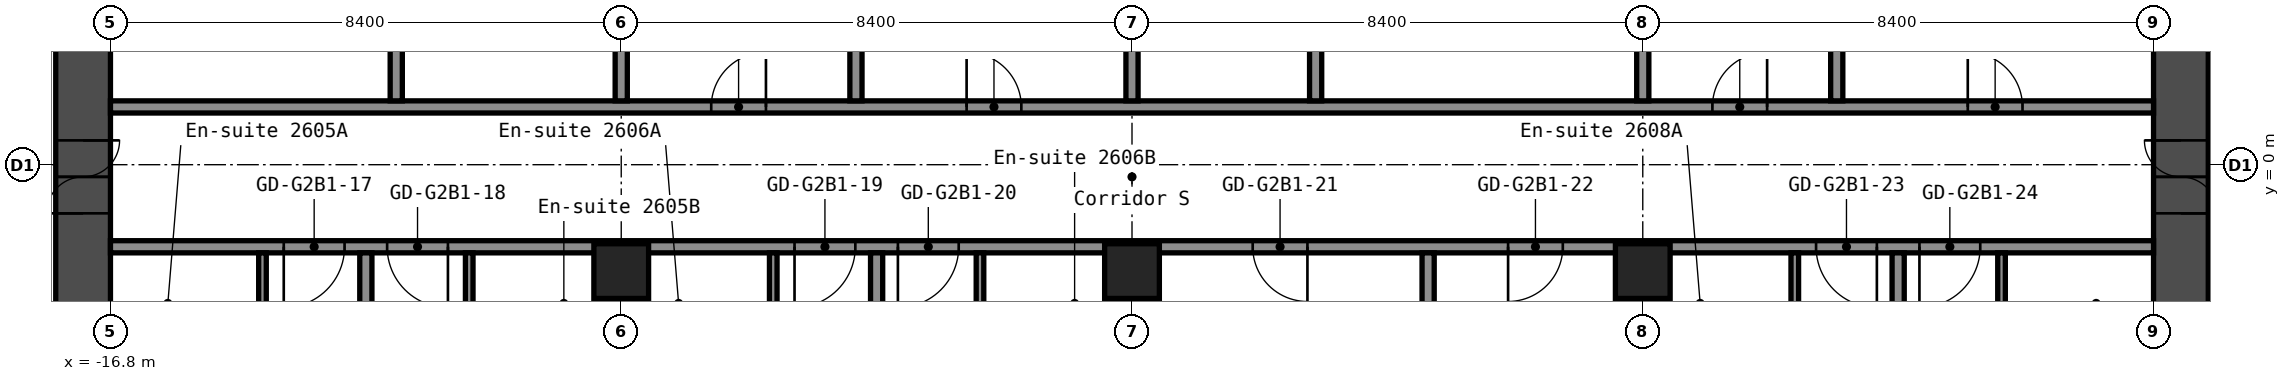
"""IFC4 building model, lengths in metres.
Left out: names, types, materials, properties, quantities, classifications, styles, units other than length and angle.
Written with IfcOpenShell. Run it as: python <this file> out.ifc"""

import sys

from ifc_helpers import new_model, si_unit, direction, frame, frame_2d, origin, origin_2d, place, context, subcontext, project, spatial, rectangle, hollow_rectangle, extrude, element, fill, save


model = new_model("IFC4")
c1 = context("Model", 3, precision=1e-05, world=origin(), true_north=direction((0.0, 1.0)))
c2 = subcontext(c1, "Body", "Model", "MODEL_VIEW")
j1 = project(units=[si_unit("LENGTHUNIT", "METRE"), si_unit("PLANEANGLEUNIT", "RADIAN")], contexts=[c1])
p1 = place(None, origin())
s1 = spatial("IfcSite", under=j1, at=p1, CompositionType="ELEMENT")
p2 = place(p1, origin())
s2 = spatial("IfcBuilding", under=s1, at=p2, CompositionType="ELEMENT")
p3 = place(p2, frame((0.0, 0.0, 94.6)))
s3 = spatial("IfcBuildingStorey", under=s2, at=p3, CompositionType="ELEMENT", Elevation=94.6)
for number, where, z_axis, x_axis in (
    (1, (-8.4, -1.75, 0.0), (0.0, 0.0, 1.0), (1.0, 0.0, 0.0)),
    (2, (0.0, -1.75, 0.0), (0.0, 0.0, 1.0), (1.0, 0.0, 0.0)),
    (3, (8.4, -1.75, 0.0), (0.0, 0.0, 1.0), (1.0, 0.0, 0.0)),
):
    element("IfcColumn", number, at=place(p3, frame(where, z_axis=z_axis, x_axis=x_axis)), inside=s3, PredefinedType="COLUMN", context=c2, shape_type="SweptSolid", body=[
        extrude(hollow_rectangle(XDim=0.9, YDim=0.9, WallThickness=0.036, at=origin_2d()), origin(), (0.0, 0.0, 1.0), 2.8),
    ])
p4 = place(p3, frame((-17.25, -8.4, 0.0), z_axis=(0.0, 0.0, 1.0), x_axis=(0.0, 1.0, 0.0)))
e4 = element("IfcWall", 4, at=p4, inside=s3, PredefinedType="SHEAR", context=c2, shape_type="SweptSolid", body=[
    extrude(rectangle(XDim=16.8, YDim=0.9, at=frame_2d((8.4, 0.0))), origin(), (0.0, 0.0, 1.0), 2.8),
])
p5 = place(p4, frame((7.6, 0.0, 0.0)))
e5 = element("IfcOpeningElement", 5, at=p5, cuts=e4, PredefinedType="OPENING", context=c2, shape_type="SweptSolid", body=[
    extrude(rectangle(XDim=1.2, YDim=2.1, at=frame_2d((0.6, 1.05))), frame((0.0, 0.46, 0.0), z_axis=(0.0, -1.0, 0.0), x_axis=(1.0, 0.0, 0.0)), (0.0, 0.0, 1.0), 0.92),
])
p6 = place(p3, frame((17.25, -8.4, 0.0), z_axis=(0.0, 0.0, 1.0), x_axis=(0.0, 1.0, 0.0)))
e6 = element("IfcWall", 6, at=p6, inside=s3, PredefinedType="SHEAR", context=c2, shape_type="SweptSolid", body=[
    extrude(rectangle(XDim=16.8, YDim=0.9, at=frame_2d((8.4, 0.0))), origin(), (0.0, 0.0, 1.0), 2.8),
])
p7 = place(p6, frame((7.6, 0.0, 0.0)))
e7 = element("IfcOpeningElement", 7, at=p7, cuts=e6, PredefinedType="OPENING", context=c2, shape_type="SweptSolid", body=[
    extrude(rectangle(XDim=1.2, YDim=2.1, at=frame_2d((0.6, 1.05))), frame((0.0, 0.46, 0.0), z_axis=(0.0, -1.0, 0.0), x_axis=(1.0, 0.0, 0.0)), (0.0, 0.0, 1.0), 0.92),
])
p8 = place(p3, frame((-16.8, -1.35, 0.0), z_axis=(0.0, 0.0, 1.0), x_axis=(1.0, 0.0, 0.0)))
e8 = element("IfcWall", 8, at=p8, inside=s3, PredefinedType="PARTITIONING", context=c2, shape_type="SweptSolid", body=[
    extrude(rectangle(XDim=33.6, YDim=0.2, at=frame_2d((16.8, 0.0))), origin(), (0.0, 0.0, 1.0), 2.8),
])
p9 = place(p8, frame((2.85, 0.0, 0.0)))
e9 = element("IfcOpeningElement", 9, at=p9, cuts=e8, PredefinedType="OPENING", context=c2, shape_type="SweptSolid", body=[
    extrude(rectangle(XDim=1.0, YDim=2.1, at=frame_2d((0.5, 1.05))), frame((0.0, 0.11, 0.0), z_axis=(0.0, -1.0, 0.0), x_axis=(1.0, 0.0, 0.0)), (0.0, 0.0, 1.0), 0.22),
])
p10 = place(p8, frame((4.55, 0.0, 0.0)))
e10 = element("IfcOpeningElement", 10, at=p10, cuts=e8, PredefinedType="OPENING", context=c2, shape_type="SweptSolid", body=[
    extrude(rectangle(XDim=1.0, YDim=2.1, at=frame_2d((0.5, 1.05))), frame((0.0, 0.11, 0.0), z_axis=(0.0, -1.0, 0.0), x_axis=(1.0, 0.0, 0.0)), (0.0, 0.0, 1.0), 0.22),
])
p11 = place(p8, frame((11.25, 0.0, 0.0)))
e11 = element("IfcOpeningElement", 11, at=p11, cuts=e8, PredefinedType="OPENING", context=c2, shape_type="SweptSolid", body=[
    extrude(rectangle(XDim=1.0, YDim=2.1, at=frame_2d((0.5, 1.05))), frame((0.0, 0.11, 0.0), z_axis=(0.0, -1.0, 0.0), x_axis=(1.0, 0.0, 0.0)), (0.0, 0.0, 1.0), 0.22),
])
p12 = place(p8, frame((12.95, 0.0, 0.0)))
e12 = element("IfcOpeningElement", 12, at=p12, cuts=e8, PredefinedType="OPENING", context=c2, shape_type="SweptSolid", body=[
    extrude(rectangle(XDim=1.0, YDim=2.1, at=frame_2d((0.5, 1.05))), frame((0.0, 0.11, 0.0), z_axis=(0.0, -1.0, 0.0), x_axis=(1.0, 0.0, 0.0)), (0.0, 0.0, 1.0), 0.22),
])
p13 = place(p8, frame((18.785, 0.0, 0.0)))
e13 = element("IfcOpeningElement", 13, at=p13, cuts=e8, PredefinedType="OPENING", context=c2, shape_type="SweptSolid", body=[
    extrude(rectangle(XDim=0.9, YDim=2.1, at=frame_2d((0.45, 1.05))), frame((0.0, 0.11, 0.0), z_axis=(0.0, -1.0, 0.0), x_axis=(1.0, 0.0, 0.0)), (0.0, 0.0, 1.0), 0.22),
])
p14 = place(p8, frame((22.985, 0.0, 0.0)))
e14 = element("IfcOpeningElement", 14, at=p14, cuts=e8, PredefinedType="OPENING", context=c2, shape_type="SweptSolid", body=[
    extrude(rectangle(XDim=0.9, YDim=2.1, at=frame_2d((0.45, 1.05))), frame((0.0, 0.11, 0.0), z_axis=(0.0, -1.0, 0.0), x_axis=(1.0, 0.0, 0.0)), (0.0, 0.0, 1.0), 0.22),
])
p15 = place(p8, frame((28.05, 0.0, 0.0)))
e15 = element("IfcOpeningElement", 15, at=p15, cuts=e8, PredefinedType="OPENING", context=c2, shape_type="SweptSolid", body=[
    extrude(rectangle(XDim=1.0, YDim=2.1, at=frame_2d((0.5, 1.05))), frame((0.0, 0.11, 0.0), z_axis=(0.0, -1.0, 0.0), x_axis=(1.0, 0.0, 0.0)), (0.0, 0.0, 1.0), 0.22),
])
p16 = place(p8, frame((29.75, 0.0, 0.0)))
e16 = element("IfcOpeningElement", 16, at=p16, cuts=e8, PredefinedType="OPENING", context=c2, shape_type="SweptSolid", body=[
    extrude(rectangle(XDim=1.0, YDim=2.1, at=frame_2d((0.5, 1.05))), frame((0.0, 0.11, 0.0), z_axis=(0.0, -1.0, 0.0), x_axis=(1.0, 0.0, 0.0)), (0.0, 0.0, 1.0), 0.22),
])
p17 = place(p3, frame((-16.8, 0.95, 0.0), z_axis=(0.0, 0.0, 1.0), x_axis=(1.0, 0.0, 0.0)))
e17 = element("IfcWall", 17, at=p17, inside=s3, PredefinedType="PARTITIONING", context=c2, shape_type="SweptSolid", body=[
    extrude(rectangle(XDim=33.6, YDim=0.2, at=frame_2d((16.8, 0.0))), origin(), (0.0, 0.0, 1.0), 2.8),
])
p18 = place(p17, frame((9.88, 0.0, 0.0)))
e18 = element("IfcOpeningElement", 18, at=p18, cuts=e17, PredefinedType="OPENING", context=c2, shape_type="SweptSolid", body=[
    extrude(rectangle(XDim=0.9, YDim=2.1, at=frame_2d((0.45, 1.05))), frame((0.0, 0.11, 0.0), z_axis=(0.0, -1.0, 0.0), x_axis=(1.0, 0.0, 0.0)), (0.0, 0.0, 1.0), 0.22),
])
p19 = place(p17, frame((14.08, 0.0, 0.0)))
e19 = element("IfcOpeningElement", 19, at=p19, cuts=e17, PredefinedType="OPENING", context=c2, shape_type="SweptSolid", body=[
    extrude(rectangle(XDim=0.9, YDim=2.1, at=frame_2d((0.45, 1.05))), frame((0.0, 0.11, 0.0), z_axis=(0.0, -1.0, 0.0), x_axis=(1.0, 0.0, 0.0)), (0.0, 0.0, 1.0), 0.22),
])
p20 = place(p17, frame((26.345, 0.0, 0.0)))
e20 = element("IfcOpeningElement", 20, at=p20, cuts=e17, PredefinedType="OPENING", context=c2, shape_type="SweptSolid", body=[
    extrude(rectangle(XDim=0.9, YDim=2.1, at=frame_2d((0.45, 1.05))), frame((0.0, 0.11, 0.0), z_axis=(0.0, -1.0, 0.0), x_axis=(1.0, 0.0, 0.0)), (0.0, 0.0, 1.0), 0.22),
])
p21 = place(p17, frame((30.545, 0.0, 0.0)))
e21 = element("IfcOpeningElement", 21, at=p21, cuts=e17, PredefinedType="OPENING", context=c2, shape_type="SweptSolid", body=[
    extrude(rectangle(XDim=0.9, YDim=2.1, at=frame_2d((0.45, 1.05))), frame((0.0, 0.11, 0.0), z_axis=(0.0, -1.0, 0.0), x_axis=(1.0, 0.0, 0.0)), (0.0, 0.0, 1.0), 0.22),
])
p22 = place(p3, frame((-14.3, -4.35, 0.0), z_axis=(0.0, 0.0, 1.0), x_axis=(0.0, 1.0, 0.0)))
e22 = element("IfcWall", 22, at=p22, inside=s3, PredefinedType="PARTITIONING", context=c2, shape_type="SweptSolid", body=[
    extrude(rectangle(XDim=2.9, YDim=0.125, at=frame_2d((1.45, 0.0))), origin(), (0.0, 0.0, 1.0), 2.8),
])
p23 = place(p22, frame((0.6, 0.0, 0.0)))
e23 = element("IfcOpeningElement", 23, at=p23, cuts=e22, PredefinedType="OPENING", context=c2, shape_type="SweptSolid", body=[
    extrude(rectangle(XDim=0.8, YDim=2.1, at=frame_2d((0.4, 1.05))), frame((0.0, 0.073, 0.0), z_axis=(0.0, -1.0, 0.0), x_axis=(1.0, 0.0, 0.0)), (0.0, 0.0, 1.0), 0.145),
])
p24 = place(p3, frame((-12.6, -15.55, 0.0), z_axis=(0.0, 0.0, 1.0), x_axis=(0.0, 1.0, 0.0)))
e24 = element("IfcWall", 24, at=p24, inside=s3, PredefinedType="PARTITIONING", context=c2, shape_type="SweptSolid", body=[
    extrude(rectangle(XDim=14.1, YDim=0.2, at=frame_2d((7.05, 0.0))), origin(), (0.0, 0.0, 1.0), 2.8),
])
p25 = place(p3, frame((-12.1, 1.05, 0.0), z_axis=(0.0, 0.0, 1.0), x_axis=(0.0, 1.0, 0.0)))
e25 = element("IfcWall", 25, at=p25, inside=s3, PredefinedType="PARTITIONING", context=c2, shape_type="SweptSolid", body=[
    extrude(rectangle(XDim=5.9, YDim=0.2, at=frame_2d((2.95, 0.0))), origin(), (0.0, 0.0, 1.0), 2.8),
])
p26 = place(p3, frame((-10.9, -4.35, 0.0), z_axis=(0.0, 0.0, 1.0), x_axis=(0.0, 1.0, 0.0)))
e26 = element("IfcWall", 26, at=p26, inside=s3, PredefinedType="PARTITIONING", context=c2, shape_type="SweptSolid", body=[
    extrude(rectangle(XDim=2.9, YDim=0.125, at=frame_2d((1.45, 0.0))), origin(), (0.0, 0.0, 1.0), 2.8),
])
p27 = place(p26, frame((0.6, 0.0, 0.0)))
e27 = element("IfcOpeningElement", 27, at=p27, cuts=e26, PredefinedType="OPENING", context=c2, shape_type="SweptSolid", body=[
    extrude(rectangle(XDim=0.8, YDim=2.1, at=frame_2d((0.4, 1.05))), frame((0.0, 0.073, 0.0), z_axis=(0.0, -1.0, 0.0), x_axis=(1.0, 0.0, 0.0)), (0.0, 0.0, 1.0), 0.145),
])
p28 = place(p3, frame((-8.4, -15.55, 0.0), z_axis=(0.0, 0.0, 1.0), x_axis=(0.0, 1.0, 0.0)))
e28 = element("IfcWall", 28, at=p28, inside=s3, PredefinedType="PARTITIONING", context=c2, shape_type="SweptSolid", body=[
    extrude(rectangle(XDim=13.36, YDim=0.2, at=frame_2d((6.68, 0.0))), origin(), (0.0, 0.0, 1.0), 2.8),
])
p29 = place(p3, frame((-8.4, 1.05, 0.0), z_axis=(0.0, 0.0, 1.0), x_axis=(0.0, 1.0, 0.0)))
e29 = element("IfcWall", 29, at=p29, inside=s3, PredefinedType="PARTITIONING", context=c2, shape_type="SweptSolid", body=[
    extrude(rectangle(XDim=5.9, YDim=0.2, at=frame_2d((2.95, 0.0))), origin(), (0.0, 0.0, 1.0), 2.8),
])
p30 = place(p3, frame((-5.9, -4.35, 0.0), z_axis=(0.0, 0.0, 1.0), x_axis=(0.0, 1.0, 0.0)))
e30 = element("IfcWall", 30, at=p30, inside=s3, PredefinedType="PARTITIONING", context=c2, shape_type="SweptSolid", body=[
    extrude(rectangle(XDim=2.9, YDim=0.125, at=frame_2d((1.45, 0.0))), origin(), (0.0, 0.0, 1.0), 2.8),
])
p31 = place(p30, frame((0.6, 0.0, 0.0)))
e31 = element("IfcOpeningElement", 31, at=p31, cuts=e30, PredefinedType="OPENING", context=c2, shape_type="SweptSolid", body=[
    extrude(rectangle(XDim=0.8, YDim=2.1, at=frame_2d((0.4, 1.05))), frame((0.0, 0.073, 0.0), z_axis=(0.0, -1.0, 0.0), x_axis=(1.0, 0.0, 0.0)), (0.0, 0.0, 1.0), 0.145),
])
p32 = place(p3, frame((-4.54, 1.05, 0.0), z_axis=(0.0, 0.0, 1.0), x_axis=(0.0, 1.0, 0.0)))
e32 = element("IfcWall", 32, at=p32, inside=s3, PredefinedType="PARTITIONING", context=c2, shape_type="SweptSolid", body=[
    extrude(rectangle(XDim=5.9, YDim=0.2, at=frame_2d((2.95, 0.0))), origin(), (0.0, 0.0, 1.0), 2.8),
])
p33 = place(p3, frame((-4.2, -15.55, 0.0), z_axis=(0.0, 0.0, 1.0), x_axis=(0.0, 1.0, 0.0)))
e33 = element("IfcWall", 33, at=p33, inside=s3, PredefinedType="PARTITIONING", context=c2, shape_type="SweptSolid", body=[
    extrude(rectangle(XDim=14.1, YDim=0.2, at=frame_2d((7.05, 0.0))), origin(), (0.0, 0.0, 1.0), 2.8),
])
p34 = place(p3, frame((-2.5, -4.35, 0.0), z_axis=(0.0, 0.0, 1.0), x_axis=(0.0, 1.0, 0.0)))
e34 = element("IfcWall", 34, at=p34, inside=s3, PredefinedType="PARTITIONING", context=c2, shape_type="SweptSolid", body=[
    extrude(rectangle(XDim=2.9, YDim=0.125, at=frame_2d((1.45, 0.0))), origin(), (0.0, 0.0, 1.0), 2.8),
])
p35 = place(p34, frame((0.6, 0.0, 0.0)))
e35 = element("IfcOpeningElement", 35, at=p35, cuts=e34, PredefinedType="OPENING", context=c2, shape_type="SweptSolid", body=[
    extrude(rectangle(XDim=0.8, YDim=2.1, at=frame_2d((0.4, 1.05))), frame((0.0, 0.073, 0.0), z_axis=(0.0, -1.0, 0.0), x_axis=(1.0, 0.0, 0.0)), (0.0, 0.0, 1.0), 0.145),
])
p36 = place(p3, frame((0.0, -15.55, 0.0), z_axis=(0.0, 0.0, 1.0), x_axis=(0.0, 1.0, 0.0)))
e36 = element("IfcWall", 36, at=p36, inside=s3, PredefinedType="PARTITIONING", context=c2, shape_type="SweptSolid", body=[
    extrude(rectangle(XDim=13.36, YDim=0.2, at=frame_2d((6.68, 0.0))), origin(), (0.0, 0.0, 1.0), 2.8),
])
for number, where, z_axis, x_axis in (
    (37, (0.0, 1.05, 0.0), (0.0, 0.0, 1.0), (0.0, 1.0, 0.0)),
    (38, (3.02, 1.05, 0.0), (0.0, 0.0, 1.0), (0.0, 1.0, 0.0)),
):
    element("IfcWall", number, at=place(p3, frame(where, z_axis=z_axis, x_axis=x_axis)), inside=s3, PredefinedType="PARTITIONING", context=c2, shape_type="SweptSolid", body=[
        extrude(rectangle(XDim=5.9, YDim=0.2, at=frame_2d((2.95, 0.0))), origin(), (0.0, 0.0, 1.0), 2.8),
    ])
p37 = place(p3, frame((4.87, -15.55, 0.0), z_axis=(0.0, 0.0, 1.0), x_axis=(0.0, 1.0, 0.0)))
e39 = element("IfcWall", 39, at=p37, inside=s3, PredefinedType="PARTITIONING", context=c2, shape_type="SweptSolid", body=[
    extrude(rectangle(XDim=14.1, YDim=0.2, at=frame_2d((7.05, 0.0))), origin(), (0.0, 0.0, 1.0), 2.8),
])
p38 = place(p3, frame((8.4, -15.55, 0.0), z_axis=(0.0, 0.0, 1.0), x_axis=(0.0, 1.0, 0.0)))
e40 = element("IfcWall", 40, at=p38, inside=s3, PredefinedType="PARTITIONING", context=c2, shape_type="SweptSolid", body=[
    extrude(rectangle(XDim=13.36, YDim=0.2, at=frame_2d((6.68, 0.0))), origin(), (0.0, 0.0, 1.0), 2.8),
])
p39 = place(p3, frame((8.4, 1.05, 0.0), z_axis=(0.0, 0.0, 1.0), x_axis=(0.0, 1.0, 0.0)))
e41 = element("IfcWall", 41, at=p39, inside=s3, PredefinedType="PARTITIONING", context=c2, shape_type="SweptSolid", body=[
    extrude(rectangle(XDim=5.9, YDim=0.2, at=frame_2d((2.95, 0.0))), origin(), (0.0, 0.0, 1.0), 2.8),
])
p40 = place(p3, frame((10.9, -4.35, 0.0), z_axis=(0.0, 0.0, 1.0), x_axis=(0.0, 1.0, 0.0)))
e42 = element("IfcWall", 42, at=p40, inside=s3, PredefinedType="PARTITIONING", context=c2, shape_type="SweptSolid", body=[
    extrude(rectangle(XDim=2.9, YDim=0.125, at=frame_2d((1.45, 0.0))), origin(), (0.0, 0.0, 1.0), 2.8),
])
p41 = place(p40, frame((0.6, 0.0, 0.0)))
e43 = element("IfcOpeningElement", 43, at=p41, cuts=e42, PredefinedType="OPENING", context=c2, shape_type="SweptSolid", body=[
    extrude(rectangle(XDim=0.8, YDim=2.1, at=frame_2d((0.4, 1.05))), frame((0.0, 0.073, 0.0), z_axis=(0.0, -1.0, 0.0), x_axis=(1.0, 0.0, 0.0)), (0.0, 0.0, 1.0), 0.145),
])
p42 = place(p3, frame((11.59, 1.05, 0.0), z_axis=(0.0, 0.0, 1.0), x_axis=(0.0, 1.0, 0.0)))
e44 = element("IfcWall", 44, at=p42, inside=s3, PredefinedType="PARTITIONING", context=c2, shape_type="SweptSolid", body=[
    extrude(rectangle(XDim=5.9, YDim=0.2, at=frame_2d((2.95, 0.0))), origin(), (0.0, 0.0, 1.0), 2.8),
])
p43 = place(p3, frame((12.6, -15.55, 0.0), z_axis=(0.0, 0.0, 1.0), x_axis=(0.0, 1.0, 0.0)))
e45 = element("IfcWall", 45, at=p43, inside=s3, PredefinedType="PARTITIONING", context=c2, shape_type="SweptSolid", body=[
    extrude(rectangle(XDim=14.1, YDim=0.2, at=frame_2d((7.05, 0.0))), origin(), (0.0, 0.0, 1.0), 2.8),
])
p44 = place(p3, frame((14.3, -4.35, 0.0), z_axis=(0.0, 0.0, 1.0), x_axis=(0.0, 1.0, 0.0)))
e46 = element("IfcWall", 46, at=p44, inside=s3, PredefinedType="PARTITIONING", context=c2, shape_type="SweptSolid", body=[
    extrude(rectangle(XDim=2.9, YDim=0.125, at=frame_2d((1.45, 0.0))), origin(), (0.0, 0.0, 1.0), 2.8),
])
p45 = place(p44, frame((0.6, 0.0, 0.0)))
e47 = element("IfcOpeningElement", 47, at=p45, cuts=e46, PredefinedType="OPENING", context=c2, shape_type="SweptSolid", body=[
    extrude(rectangle(XDim=0.8, YDim=2.1, at=frame_2d((0.4, 1.05))), frame((0.0, 0.073, 0.0), z_axis=(0.0, -1.0, 0.0), x_axis=(1.0, 0.0, 0.0)), (0.0, 0.0, 1.0), 0.145),
])
p46 = place(p5, origin())
e48 = element("IfcDoor", 48, at=p46, inside=s3, OperationType="DOUBLE_DOOR_SINGLE_SWING", PredefinedType="DOOR", context=c2, shape_type="SweptSolid", body=[
    extrude(rectangle(XDim=1.2, YDim=2.1, at=frame_2d((0.6, 1.05))), frame((0.0, 0.025, 0.0), z_axis=(0.0, -1.0, 0.0), x_axis=(1.0, 0.0, 0.0)), (0.0, 0.0, 1.0), 0.05),
])
fill(e5, e48)
p47 = place(p7, origin())
e49 = element("IfcDoor", 49, at=p47, inside=s3, OperationType="DOUBLE_DOOR_SINGLE_SWING", PredefinedType="DOOR", context=c2, shape_type="SweptSolid", body=[
    extrude(rectangle(XDim=1.2, YDim=2.1, at=frame_2d((0.6, 1.05))), frame((0.0, 0.025, 0.0), z_axis=(0.0, -1.0, 0.0), x_axis=(1.0, 0.0, 0.0)), (0.0, 0.0, 1.0), 0.05),
])
fill(e7, e49)
p48 = place(p9, origin())
e50 = element("IfcDoor", 50, at=p48, inside=s3, OperationType="SINGLE_SWING_LEFT", PredefinedType="DOOR", context=c2, shape_type="SweptSolid", body=[
    extrude(rectangle(XDim=1.0, YDim=2.1, at=frame_2d((0.5, 1.05))), frame((0.0, 0.025, 0.0), z_axis=(0.0, -1.0, 0.0), x_axis=(1.0, 0.0, 0.0)), (0.0, 0.0, 1.0), 0.05),
])
fill(e9, e50)
p49 = place(p10, origin())
e51 = element("IfcDoor", 51, at=p49, inside=s3, OperationType="SINGLE_SWING_RIGHT", PredefinedType="DOOR", context=c2, shape_type="SweptSolid", body=[
    extrude(rectangle(XDim=1.0, YDim=2.1, at=frame_2d((0.5, 1.05))), frame((0.0, 0.025, 0.0), z_axis=(0.0, -1.0, 0.0), x_axis=(1.0, 0.0, 0.0)), (0.0, 0.0, 1.0), 0.05),
])
fill(e10, e51)
p50 = place(p11, origin())
e52 = element("IfcDoor", 52, at=p50, inside=s3, OperationType="SINGLE_SWING_LEFT", PredefinedType="DOOR", context=c2, shape_type="SweptSolid", body=[
    extrude(rectangle(XDim=1.0, YDim=2.1, at=frame_2d((0.5, 1.05))), frame((0.0, 0.025, 0.0), z_axis=(0.0, -1.0, 0.0), x_axis=(1.0, 0.0, 0.0)), (0.0, 0.0, 1.0), 0.05),
])
fill(e11, e52)
p51 = place(p12, origin())
e53 = element("IfcDoor", 53, at=p51, inside=s3, OperationType="SINGLE_SWING_LEFT", PredefinedType="DOOR", context=c2, shape_type="SweptSolid", body=[
    extrude(rectangle(XDim=1.0, YDim=2.1, at=frame_2d((0.5, 1.05))), frame((0.0, 0.025, 0.0), z_axis=(0.0, -1.0, 0.0), x_axis=(1.0, 0.0, 0.0)), (0.0, 0.0, 1.0), 0.05),
])
fill(e12, e53)
p52 = place(p13, origin())
e54 = element("IfcDoor", 54, at=p52, inside=s3, OperationType="SINGLE_SWING_RIGHT", PredefinedType="DOOR", context=c2, shape_type="SweptSolid", body=[
    extrude(rectangle(XDim=0.9, YDim=2.1, at=frame_2d((0.45, 1.05))), frame((0.0, 0.025, 0.0), z_axis=(0.0, -1.0, 0.0), x_axis=(1.0, 0.0, 0.0)), (0.0, 0.0, 1.0), 0.05),
])
fill(e13, e54)
p53 = place(p14, origin())
e55 = element("IfcDoor", 55, at=p53, inside=s3, OperationType="SINGLE_SWING_LEFT", PredefinedType="DOOR", context=c2, shape_type="SweptSolid", body=[
    extrude(rectangle(XDim=0.9, YDim=2.1, at=frame_2d((0.45, 1.05))), frame((0.0, 0.025, 0.0), z_axis=(0.0, -1.0, 0.0), x_axis=(1.0, 0.0, 0.0)), (0.0, 0.0, 1.0), 0.05),
])
fill(e14, e55)
p54 = place(p15, origin())
e56 = element("IfcDoor", 56, at=p54, inside=s3, OperationType="SINGLE_SWING_RIGHT", PredefinedType="DOOR", context=c2, shape_type="SweptSolid", body=[
    extrude(rectangle(XDim=1.0, YDim=2.1, at=frame_2d((0.5, 1.05))), frame((0.0, 0.025, 0.0), z_axis=(0.0, -1.0, 0.0), x_axis=(1.0, 0.0, 0.0)), (0.0, 0.0, 1.0), 0.05),
])
fill(e15, e56)
p55 = place(p16, origin())
e57 = element("IfcDoor", 57, at=p55, inside=s3, OperationType="SINGLE_SWING_LEFT", PredefinedType="DOOR", context=c2, shape_type="SweptSolid", body=[
    extrude(rectangle(XDim=1.0, YDim=2.1, at=frame_2d((0.5, 1.05))), frame((0.0, 0.025, 0.0), z_axis=(0.0, -1.0, 0.0), x_axis=(1.0, 0.0, 0.0)), (0.0, 0.0, 1.0), 0.05),
])
fill(e16, e57)
p56 = place(p18, origin())
e58 = element("IfcDoor", 58, at=p56, inside=s3, OperationType="SINGLE_SWING_LEFT", PredefinedType="DOOR", context=c2, shape_type="SweptSolid", body=[
    extrude(rectangle(XDim=0.9, YDim=2.1, at=frame_2d((0.45, 1.05))), frame((0.0, 0.025, 0.0), z_axis=(0.0, -1.0, 0.0), x_axis=(1.0, 0.0, 0.0)), (0.0, 0.0, 1.0), 0.05),
])
fill(e18, e58)
p57 = place(p19, origin())
e59 = element("IfcDoor", 59, at=p57, inside=s3, OperationType="SINGLE_SWING_RIGHT", PredefinedType="DOOR", context=c2, shape_type="SweptSolid", body=[
    extrude(rectangle(XDim=0.9, YDim=2.1, at=frame_2d((0.45, 1.05))), frame((0.0, 0.025, 0.0), z_axis=(0.0, -1.0, 0.0), x_axis=(1.0, 0.0, 0.0)), (0.0, 0.0, 1.0), 0.05),
])
fill(e19, e59)
p58 = place(p20, origin())
e60 = element("IfcDoor", 60, at=p58, inside=s3, OperationType="SINGLE_SWING_LEFT", PredefinedType="DOOR", context=c2, shape_type="SweptSolid", body=[
    extrude(rectangle(XDim=0.9, YDim=2.1, at=frame_2d((0.45, 1.05))), frame((0.0, 0.025, 0.0), z_axis=(0.0, -1.0, 0.0), x_axis=(1.0, 0.0, 0.0)), (0.0, 0.0, 1.0), 0.05),
])
fill(e20, e60)
p59 = place(p21, origin())
e61 = element("IfcDoor", 61, at=p59, inside=s3, OperationType="SINGLE_SWING_RIGHT", PredefinedType="DOOR", context=c2, shape_type="SweptSolid", body=[
    extrude(rectangle(XDim=0.9, YDim=2.1, at=frame_2d((0.45, 1.05))), frame((0.0, 0.025, 0.0), z_axis=(0.0, -1.0, 0.0), x_axis=(1.0, 0.0, 0.0)), (0.0, 0.0, 1.0), 0.05),
])
fill(e21, e61)
save(model, sys.argv[1])
